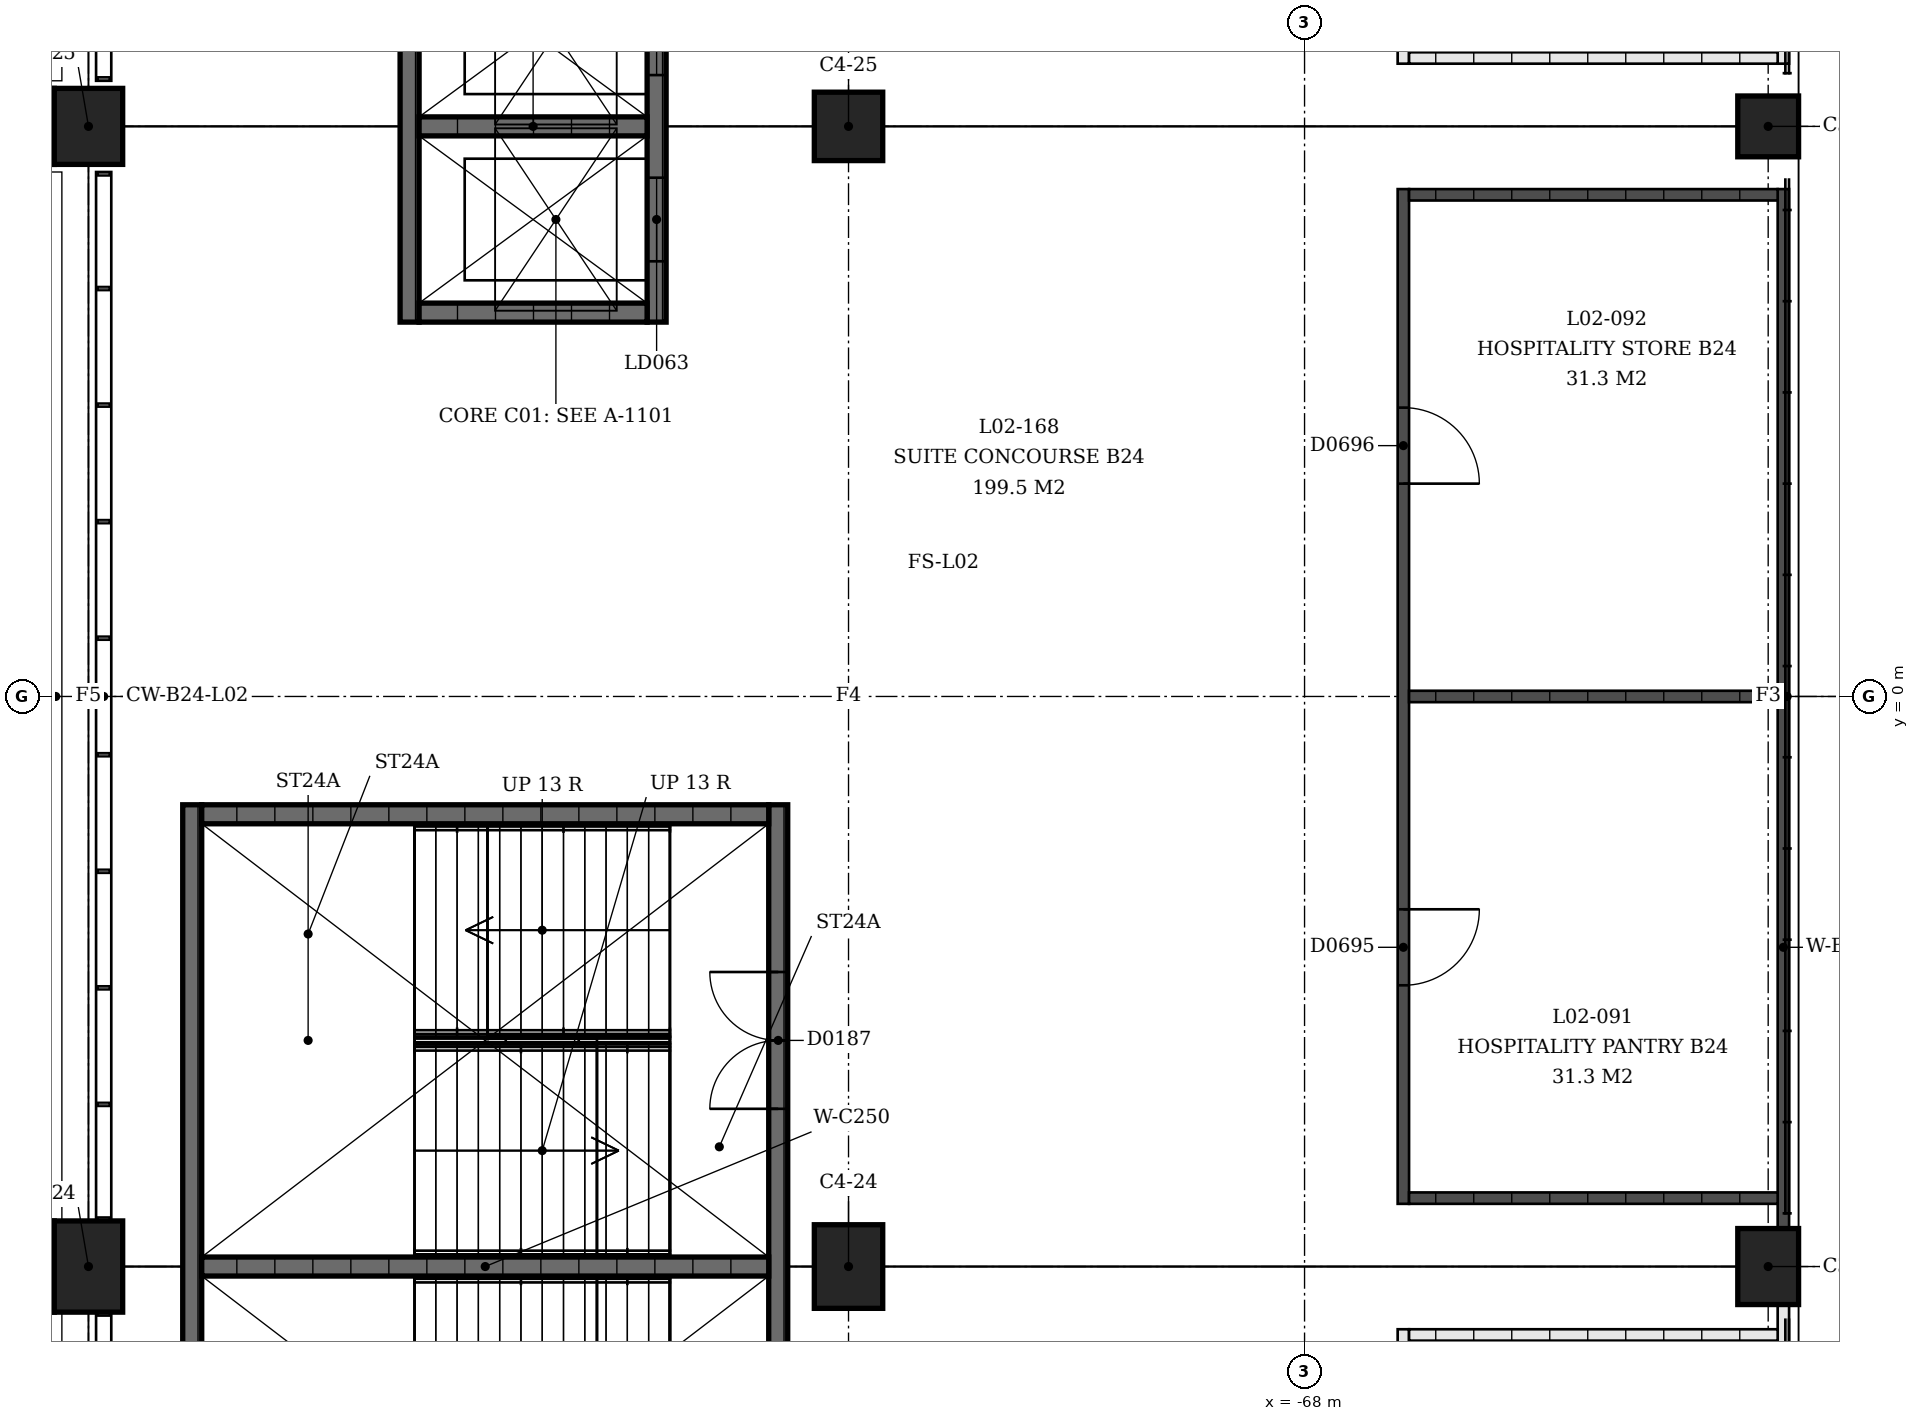
"""IFC4 building model, lengths in metres.
Left out: names, types, materials, properties, quantities, classifications, styles, units other than length and angle.
Written with IfcOpenShell. Run it as: python <this file> out.ifc"""

import sys

from ifc_helpers import new_model, si_unit, direction, frame, frame_2d, origin, origin_2d, place, context, subcontext, project, spatial, rectangle, extrude, element, fill, save


model = new_model("IFC4")
c1 = context("Model", 3, precision=1e-05, world=origin(), true_north=direction((0.0, 1.0)))
c2 = subcontext(c1, "Body", "Model", "MODEL_VIEW")
j1 = project(units=[si_unit("LENGTHUNIT", "METRE"), si_unit("PLANEANGLEUNIT", "RADIAN")], contexts=[c1])
p1 = place(None, origin())
s1 = spatial("IfcSite", under=j1, at=p1, CompositionType="ELEMENT")
p2 = place(p1, origin())
s2 = spatial("IfcBuilding", under=s1, at=p2, CompositionType="ELEMENT")
p3 = place(p2, frame((0.0, 0.0, 9.0)))
s3 = spatial("IfcBuildingStorey", under=s2, at=p3, CompositionType="ELEMENT", Elevation=9.0)
p4 = place(p3, frame((-61.9, -7.5, 0.0), z_axis=(0.0, 0.0, 1.0), x_axis=(0.0, -1.0, 0.0)))
e1 = element("IfcColumn", 1, at=p4, inside=s3, PredefinedType="COLUMN", context=c2, shape_type="SweptSolid", body=[
    extrude(rectangle(XDim=1.0, YDim=0.8, at=origin_2d()), origin(), (0.0, 0.0, 1.0), 4.5),
])
p5 = place(p3, frame((-74.0, -7.5, 0.0), z_axis=(0.0, 0.0, 1.0), x_axis=(0.0, -1.0, 0.0)))
e2 = element("IfcColumn", 2, at=p5, inside=s3, PredefinedType="COLUMN", context=c2, shape_type="SweptSolid", body=[
    extrude(rectangle(XDim=1.1, YDim=0.9, at=origin_2d()), origin(), (0.0, 0.0, 1.0), 4.5),
])
p6 = place(p3, frame((-84.0, -7.5, 0.0), z_axis=(0.0, 0.0, 1.0), x_axis=(0.0, -1.0, 0.0)))
e3 = element("IfcColumn", 3, at=p6, inside=s3, PredefinedType="COLUMN", context=c2, shape_type="SweptSolid", body=[
    extrude(rectangle(XDim=1.2, YDim=0.9, at=origin_2d()), origin(), (0.0, 0.0, 1.0), 4.5),
])
p7 = place(p3, frame((-61.9, 7.5, 0.0), z_axis=(0.0, 0.0, 1.0), x_axis=(0.0, -1.0, 0.0)))
e4 = element("IfcColumn", 4, at=p7, inside=s3, PredefinedType="COLUMN", context=c2, shape_type="SweptSolid", body=[
    extrude(rectangle(XDim=0.8, YDim=0.8, at=origin_2d()), origin(), (0.0, 0.0, 1.0), 4.5),
])
p8 = place(p3, frame((-74.0, 7.5, 0.0), z_axis=(0.0, 0.0, 1.0), x_axis=(0.0, -1.0, 0.0)))
e5 = element("IfcColumn", 5, at=p8, inside=s3, PredefinedType="COLUMN", context=c2, shape_type="SweptSolid", body=[
    extrude(rectangle(XDim=0.9, YDim=0.9, at=origin_2d()), origin(), (0.0, 0.0, 1.0), 4.5),
])
p9 = place(p3, frame((-84.0, 7.5, 0.0), z_axis=(0.0, 0.0, 1.0), x_axis=(0.0, -1.0, 0.0)))
e6 = element("IfcColumn", 6, at=p9, inside=s3, PredefinedType="COLUMN", context=c2, shape_type="SweptSolid", body=[
    extrude(rectangle(XDim=1.0, YDim=0.9, at=origin_2d()), origin(), (0.0, 0.0, 1.0), 4.5),
])
p10 = place(p3, frame((-74.925, -1.425, 0.0), z_axis=(0.0, 0.0, 1.0), x_axis=(0.0, -1.0, 0.0)))
e7 = element("IfcWall", 7, at=p10, inside=s3, PredefinedType="SHEAR", context=c2, shape_type="SweptSolid", body=[
    extrude(rectangle(XDim=12.15, YDim=0.25, at=frame_2d((6.075, 0.0))), origin(), (0.0, 0.0, 1.0), 4.09),
])
p11 = place(p10, frame((2.2, 0.0, 0.0)))
e8 = element("IfcOpeningElement", 8, at=p11, cuts=e7, PredefinedType="OPENING", context=c2, shape_type="SweptSolid", body=[
    extrude(rectangle(XDim=1.8, YDim=2.1, at=frame_2d((0.9, 1.05))), frame((0.0, 0.125, 0.0), z_axis=(0.0, -1.0, 0.0), x_axis=(1.0, 0.0, 0.0)), (0.0, 0.0, 1.0), 0.25),
])
p12 = place(p10, frame((8.15, 0.0, 0.0)))
e9 = element("IfcOpeningElement", 9, at=p12, cuts=e7, PredefinedType="OPENING", context=c2, shape_type="SweptSolid", body=[
    extrude(rectangle(XDim=1.8, YDim=2.1, at=frame_2d((0.9, 1.05))), frame((0.0, 0.125, 0.0), z_axis=(0.0, -1.0, 0.0), x_axis=(1.0, 0.0, 0.0)), (0.0, 0.0, 1.0), 0.25),
])
p13 = place(p3, frame((-82.635, -1.425, 0.0), z_axis=(0.0, 0.0, 1.0), x_axis=(0.0, -1.0, 0.0)))
e10 = element("IfcWall", 10, at=p13, inside=s3, PredefinedType="SHEAR", context=c2, shape_type="SweptSolid", body=[
    extrude(rectangle(XDim=12.15, YDim=0.25, at=frame_2d((6.075, 0.0))), origin(), (0.0, 0.0, 1.0), 4.09),
])
for number, where, z_axis, x_axis in (
    (11, (-75.05, -1.55, 0.0), (0.0, 0.0, 1.0), (-1.0, 0.0, 0.0)),
    (12, (-75.05, -7.5, 0.0), (0.0, 0.0, 1.0), (-1.0, 0.0, 0.0)),
):
    element("IfcWall", number, at=place(p3, frame(where, z_axis=z_axis, x_axis=x_axis)), inside=s3, PredefinedType="SHEAR", context=c2, shape_type="SweptSolid", body=[
        extrude(rectangle(XDim=7.46, YDim=0.25, at=frame_2d((3.73, 0.0))), origin(), (0.0, 0.0, 1.0), 4.09),
    ])
p14 = place(p3, frame((-76.525, 10.075, 0.0), z_axis=(0.0, 0.0, 1.0), x_axis=(0.0, -1.0, 0.0)))
e13 = element("IfcWall", 13, at=p14, inside=s3, PredefinedType="SHEAR", context=c2, shape_type="SweptSolid", body=[
    extrude(rectangle(XDim=5.15, YDim=0.25, at=frame_2d((2.575, 0.0))), origin(), (0.0, 0.0, 1.0), 4.09),
])
p15 = place(p14, frame((0.8, 0.0, 0.0)))
e14 = element("IfcOpeningElement", 14, at=p15, cuts=e13, PredefinedType="OPENING", context=c2, shape_type="SweptSolid", body=[
    extrude(rectangle(XDim=1.1, YDim=2.1, at=frame_2d((0.55, 1.05))), frame((0.0, 0.125, 0.0), z_axis=(0.0, -1.0, 0.0), x_axis=(1.0, 0.0, 0.0)), (0.0, 0.0, 1.0), 0.25),
])
p16 = place(p14, frame((3.25, 0.0, 0.0)))
e15 = element("IfcOpeningElement", 15, at=p16, cuts=e13, PredefinedType="OPENING", context=c2, shape_type="SweptSolid", body=[
    extrude(rectangle(XDim=1.1, YDim=2.1, at=frame_2d((0.55, 1.05))), frame((0.0, 0.125, 0.0), z_axis=(0.0, -1.0, 0.0), x_axis=(1.0, 0.0, 0.0)), (0.0, 0.0, 1.0), 0.25),
])
p17 = place(p3, frame((-79.775, 10.075, 0.0), z_axis=(0.0, 0.0, 1.0), x_axis=(0.0, -1.0, 0.0)))
e16 = element("IfcWall", 16, at=p17, inside=s3, PredefinedType="SHEAR", context=c2, shape_type="SweptSolid", body=[
    extrude(rectangle(XDim=5.15, YDim=0.25, at=frame_2d((2.575, 0.0))), origin(), (0.0, 0.0, 1.0), 4.09),
])
for number, where, z_axis, x_axis in (
    (17, (-76.65, 5.05, 0.0), (0.0, 0.0, 1.0), (-1.0, 0.0, 0.0)),
    (18, (-76.65, 7.5, 0.0), (0.0, 0.0, 1.0), (-1.0, 0.0, 0.0)),
):
    element("IfcWall", number, at=place(p3, frame(where, z_axis=z_axis, x_axis=x_axis)), inside=s3, PredefinedType="SHEAR", context=c2, shape_type="SweptSolid", body=[
        extrude(rectangle(XDim=3.0, YDim=0.25, at=frame_2d((1.5, 0.0))), origin(), (0.0, 0.0, 1.0), 4.09),
    ])
p18 = place(p3, frame((-61.7, -8.0, 0.0), z_axis=(0.0, 0.0, 1.0), x_axis=(0.0, -1.0, 0.0)))
e19 = element("IfcWall", 19, at=p18, inside=s3, PredefinedType="PARTITIONING", context=c2, shape_type="SweptSolid", body=[
    extrude(rectangle(XDim=13.675, YDim=0.15, at=frame_2d((6.837, 0.0))), origin(), (0.0, 0.0, 1.0), 3.0),
])
p19 = place(p3, frame((-66.7, -8.325, 0.0), z_axis=(0.0, 0.0, 1.0), x_axis=(0.0, -1.0, 0.0)))
e20 = element("IfcWall", 20, at=p19, inside=s3, PredefinedType="PARTITIONING", context=c2, shape_type="SweptSolid", body=[
    extrude(rectangle(XDim=13.35, YDim=0.15, at=frame_2d((6.675, 0.0))), origin(), (0.0, 0.0, 1.0), 3.0),
])
p20 = place(p19, frame((1.671, 0.0, 0.0)))
e21 = element("IfcOpeningElement", 21, at=p20, cuts=e20, PredefinedType="OPENING", context=c2, shape_type="SweptSolid", body=[
    extrude(rectangle(XDim=0.9, YDim=2.1, at=frame_2d((0.45, 1.05))), frame((0.0, 0.075, 0.0), z_axis=(0.0, -1.0, 0.0), x_axis=(1.0, 0.0, 0.0)), (0.0, 0.0, 1.0), 0.15),
])
p21 = place(p19, frame((5.763, 0.0, 0.0)))
e22 = element("IfcOpeningElement", 22, at=p21, cuts=e20, PredefinedType="OPENING", context=c2, shape_type="SweptSolid", body=[
    extrude(rectangle(XDim=0.9, YDim=2.1, at=frame_2d((0.45, 1.05))), frame((0.0, 0.075, 0.0), z_axis=(0.0, -1.0, 0.0), x_axis=(1.0, 0.0, 0.0)), (0.0, 0.0, 1.0), 0.15),
])
p22 = place(p19, frame((8.963, 0.0, 0.0)))
e23 = element("IfcOpeningElement", 23, at=p22, cuts=e20, PredefinedType="OPENING", context=c2, shape_type="SweptSolid", body=[
    extrude(rectangle(XDim=1.1, YDim=2.1, at=frame_2d((0.55, 1.05))), frame((0.0, 0.075, 0.0), z_axis=(0.0, -1.0, 0.0), x_axis=(1.0, 0.0, 0.0)), (0.0, 0.0, 1.0), 0.15),
])
p23 = place(p19, frame((11.471, 0.0, 0.0)))
e24 = element("IfcOpeningElement", 24, at=p23, cuts=e20, PredefinedType="OPENING", context=c2, shape_type="SweptSolid", body=[
    extrude(rectangle(XDim=1.1, YDim=2.1, at=frame_2d((0.55, 1.05))), frame((0.0, 0.075, 0.0), z_axis=(0.0, -1.0, 0.0), x_axis=(1.0, 0.0, 0.0)), (0.0, 0.0, 1.0), 0.15),
])
p24 = place(p3, frame((-61.775, -8.4, 0.0), z_axis=(0.0, 0.0, 1.0), x_axis=(-1.0, 0.0, 0.0)))
e25 = element("IfcWall", 25, at=p24, inside=s3, PredefinedType="PARTITIONING", context=c2, shape_type="SweptSolid", body=[
    extrude(rectangle(XDim=4.85, YDim=0.15, at=frame_2d((2.425, 0.0))), origin(), (0.0, 0.0, 1.0), 3.0),
])
p25 = place(p3, frame((-61.7, -7.0, 0.0), z_axis=(0.0, 0.0, 1.0), x_axis=(0.0, 1.0, 0.0)))
e26 = element("IfcWall", 26, at=p25, inside=s3, PredefinedType="SOLIDWALL", context=c2, shape_type="SweptSolid", body=[
    extrude(rectangle(XDim=13.675, YDim=0.15, at=frame_2d((6.837, 0.0))), origin(), (0.0, 0.0, 1.0), 3.0),
])
p26 = place(p3, frame((-66.7, -6.675, 0.0), z_axis=(0.0, 0.0, 1.0), x_axis=(0.0, 1.0, 0.0)))
e27 = element("IfcWall", 27, at=p26, inside=s3, PredefinedType="SOLIDWALL", context=c2, shape_type="SweptSolid", body=[
    extrude(rectangle(XDim=13.35, YDim=0.15, at=frame_2d((6.675, 0.0))), origin(), (0.0, 0.0, 1.0), 3.0),
])
p27 = place(p26, frame((2.875, 0.0, 0.0)))
e28 = element("IfcOpeningElement", 28, at=p27, cuts=e27, PredefinedType="OPENING", context=c2, shape_type="SweptSolid", body=[
    extrude(rectangle(XDim=1.0, YDim=2.1, at=frame_2d((0.5, 1.05))), frame((0.0, 0.075, 0.0), z_axis=(0.0, -1.0, 0.0), x_axis=(1.0, 0.0, 0.0)), (0.0, 0.0, 1.0), 0.15),
])
p28 = place(p26, frame((9.475, 0.0, 0.0)))
e29 = element("IfcOpeningElement", 29, at=p28, cuts=e27, PredefinedType="OPENING", context=c2, shape_type="SweptSolid", body=[
    extrude(rectangle(XDim=1.0, YDim=2.1, at=frame_2d((0.5, 1.05))), frame((0.0, 0.075, 0.0), z_axis=(0.0, -1.0, 0.0), x_axis=(1.0, 0.0, 0.0)), (0.0, 0.0, 1.0), 0.15),
])
for number, where, z_axis, x_axis in (
    (30, (-61.775, -6.6, 0.0), (0.0, 0.0, 1.0), (-1.0, 0.0, 0.0)),
    (31, (-61.775, 0.0, 0.0), (0.0, 0.0, 1.0), (-1.0, 0.0, 0.0)),
    (32, (-61.775, 6.6, 0.0), (0.0, 0.0, 1.0), (-1.0, 0.0, 0.0)),
):
    element("IfcWall", number, at=place(p3, frame(where, z_axis=z_axis, x_axis=x_axis)), inside=s3, PredefinedType="SOLIDWALL", context=c2, shape_type="SweptSolid", body=[
        extrude(rectangle(XDim=4.85, YDim=0.15, at=frame_2d((2.425, 0.0))), origin(), (0.0, 0.0, 1.0), 3.0),
    ])
p29 = place(p3, frame((-61.7, 22.0, 0.0), z_axis=(0.0, 0.0, 1.0), x_axis=(0.0, -1.0, 0.0)))
e33 = element("IfcWall", 33, at=p29, inside=s3, PredefinedType="PARTITIONING", context=c2, shape_type="SweptSolid", body=[
    extrude(rectangle(XDim=13.675, YDim=0.15, at=frame_2d((6.837, 0.0))), origin(), (0.0, 0.0, 1.0), 3.0),
])
p30 = place(p3, frame((-66.7, 21.675, 0.0), z_axis=(0.0, 0.0, 1.0), x_axis=(0.0, -1.0, 0.0)))
e34 = element("IfcWall", 34, at=p30, inside=s3, PredefinedType="PARTITIONING", context=c2, shape_type="SweptSolid", body=[
    extrude(rectangle(XDim=13.35, YDim=0.15, at=frame_2d((6.675, 0.0))), origin(), (0.0, 0.0, 1.0), 3.0),
])
p31 = place(p30, frame((1.671, 0.0, 0.0)))
e35 = element("IfcOpeningElement", 35, at=p31, cuts=e34, PredefinedType="OPENING", context=c2, shape_type="SweptSolid", body=[
    extrude(rectangle(XDim=0.9, YDim=2.1, at=frame_2d((0.45, 1.05))), frame((0.0, 0.075, 0.0), z_axis=(0.0, -1.0, 0.0), x_axis=(1.0, 0.0, 0.0)), (0.0, 0.0, 1.0), 0.15),
])
p32 = place(p30, frame((5.763, 0.0, 0.0)))
e36 = element("IfcOpeningElement", 36, at=p32, cuts=e34, PredefinedType="OPENING", context=c2, shape_type="SweptSolid", body=[
    extrude(rectangle(XDim=0.9, YDim=2.1, at=frame_2d((0.45, 1.05))), frame((0.0, 0.075, 0.0), z_axis=(0.0, -1.0, 0.0), x_axis=(1.0, 0.0, 0.0)), (0.0, 0.0, 1.0), 0.15),
])
p33 = place(p30, frame((8.963, 0.0, 0.0)))
e37 = element("IfcOpeningElement", 37, at=p33, cuts=e34, PredefinedType="OPENING", context=c2, shape_type="SweptSolid", body=[
    extrude(rectangle(XDim=1.1, YDim=2.1, at=frame_2d((0.55, 1.05))), frame((0.0, 0.075, 0.0), z_axis=(0.0, -1.0, 0.0), x_axis=(1.0, 0.0, 0.0)), (0.0, 0.0, 1.0), 0.15),
])
p34 = place(p30, frame((11.471, 0.0, 0.0)))
e38 = element("IfcOpeningElement", 38, at=p34, cuts=e34, PredefinedType="OPENING", context=c2, shape_type="SweptSolid", body=[
    extrude(rectangle(XDim=1.1, YDim=2.1, at=frame_2d((0.55, 1.05))), frame((0.0, 0.075, 0.0), z_axis=(0.0, -1.0, 0.0), x_axis=(1.0, 0.0, 0.0)), (0.0, 0.0, 1.0), 0.15),
])
p35 = place(p3, frame((-61.775, 8.4, 0.0), z_axis=(0.0, 0.0, 1.0), x_axis=(-1.0, 0.0, 0.0)))
e39 = element("IfcWall", 39, at=p35, inside=s3, PredefinedType="PARTITIONING", context=c2, shape_type="SweptSolid", body=[
    extrude(rectangle(XDim=4.85, YDim=0.15, at=frame_2d((2.425, 0.0))), origin(), (0.0, 0.0, 1.0), 3.0),
])
p36 = place(p11, origin())
e40 = element("IfcDoor", 40, at=p36, inside=s3, OperationType="DOUBLE_DOOR_SINGLE_SWING", PredefinedType="DOOR", context=c2, shape_type="SweptSolid", body=[
    extrude(rectangle(XDim=1.8, YDim=2.1, at=frame_2d((0.9, 1.05))), frame((0.0, 0.025, 0.0), z_axis=(0.0, -1.0, 0.0), x_axis=(1.0, 0.0, 0.0)), (0.0, 0.0, 1.0), 0.05),
])
fill(e8, e40)
p37 = place(p15, origin())
e41 = element("IfcDoor", 41, at=p37, inside=s3, OperationType="SLIDING_TO_LEFT", PredefinedType="DOOR", context=c2, shape_type="SweptSolid", body=[
    extrude(rectangle(XDim=1.1, YDim=2.1, at=frame_2d((0.55, 1.05))), frame((0.0, 0.025, 0.0), z_axis=(0.0, -1.0, 0.0), x_axis=(1.0, 0.0, 0.0)), (0.0, 0.0, 1.0), 0.05),
])
fill(e14, e41)
p38 = place(p16, origin())
e42 = element("IfcDoor", 42, at=p38, inside=s3, OperationType="SLIDING_TO_LEFT", PredefinedType="DOOR", context=c2, shape_type="SweptSolid", body=[
    extrude(rectangle(XDim=1.1, YDim=2.1, at=frame_2d((0.55, 1.05))), frame((0.0, 0.025, 0.0), z_axis=(0.0, -1.0, 0.0), x_axis=(1.0, 0.0, 0.0)), (0.0, 0.0, 1.0), 0.05),
])
fill(e15, e42)
p39 = place(p27, origin())
e43 = element("IfcDoor", 43, at=p39, inside=s3, OperationType="SINGLE_SWING_RIGHT", PredefinedType="DOOR", context=c2, shape_type="SweptSolid", body=[
    extrude(rectangle(XDim=1.0, YDim=2.1, at=frame_2d((0.5, 1.05))), frame((0.0, 0.025, 0.0), z_axis=(0.0, -1.0, 0.0), x_axis=(1.0, 0.0, 0.0)), (0.0, 0.0, 1.0), 0.05),
])
fill(e28, e43)
p40 = place(p28, origin())
e44 = element("IfcDoor", 44, at=p40, inside=s3, OperationType="SINGLE_SWING_LEFT", PredefinedType="DOOR", context=c2, shape_type="SweptSolid", body=[
    extrude(rectangle(XDim=1.0, YDim=2.1, at=frame_2d((0.5, 1.05))), frame((0.0, 0.025, 0.0), z_axis=(0.0, -1.0, 0.0), x_axis=(1.0, 0.0, 0.0)), (0.0, 0.0, 1.0), 0.05),
])
fill(e29, e44)
save(model, sys.argv[1])
